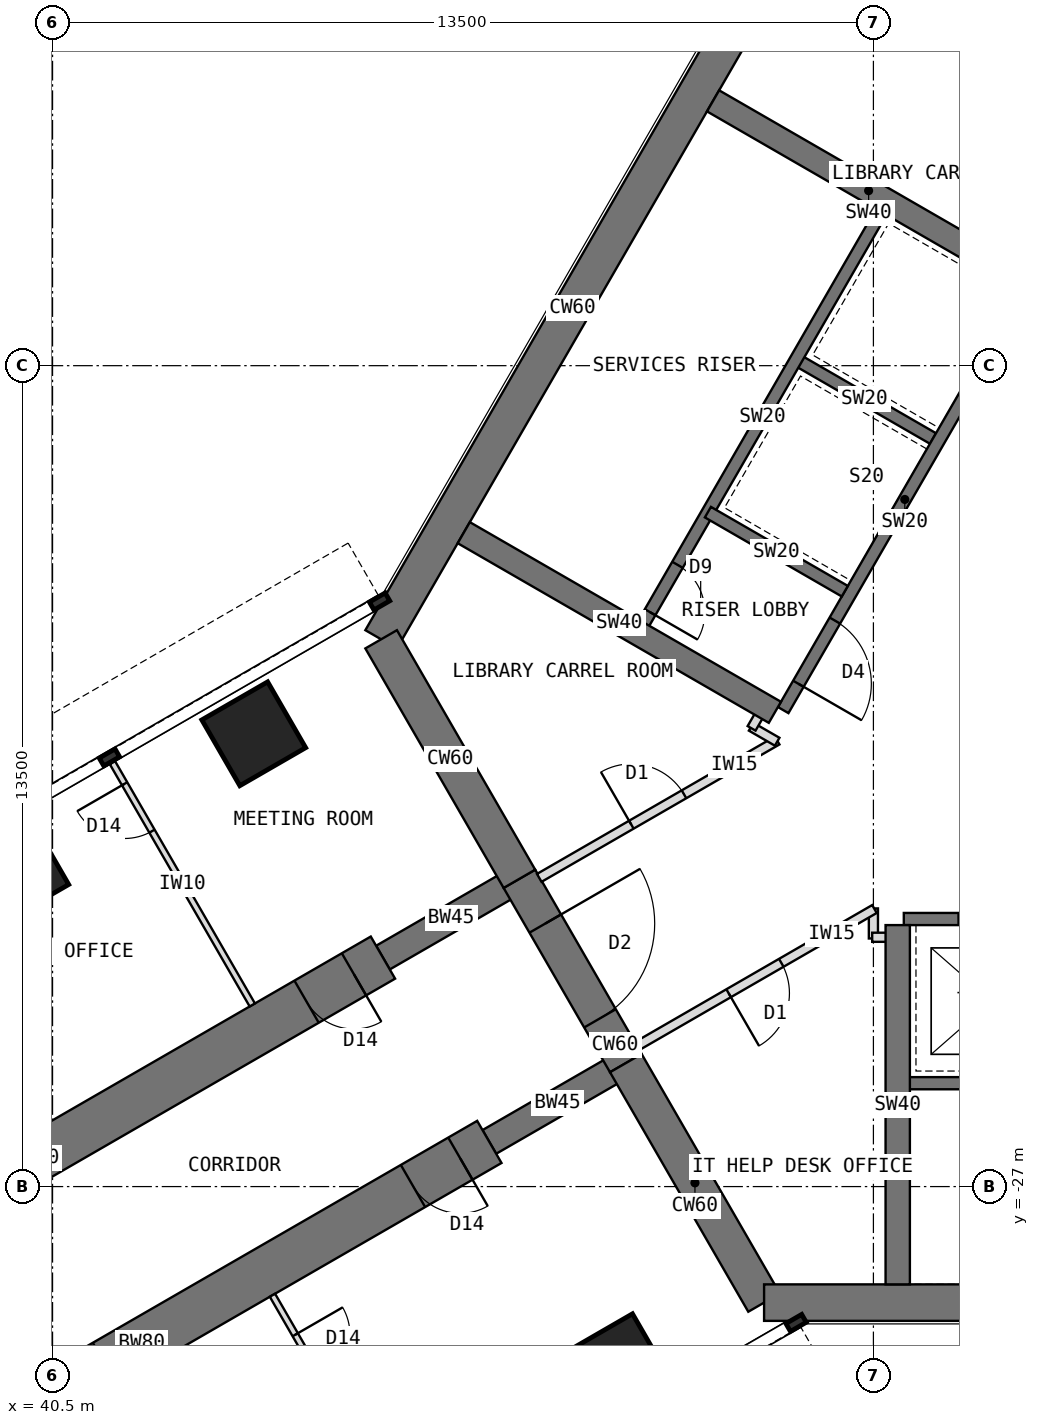
"""IFC4 building model, lengths in metres.
Left out: names, types, materials, properties, quantities, classifications, styles, units other than length and angle.
Written with IfcOpenShell. Run it as: python <this file> out.ifc"""

import sys

from ifc_helpers import new_model, si_unit, direction, frame, frame_2d, origin, origin_2d, place, context, subcontext, project, spatial, rectangle, extrude, element, fill, save


model = new_model("IFC4")
c1 = context("Model", 3, precision=1e-05, world=origin(), true_north=direction((0.0, 1.0)))
c2 = subcontext(c1, "Body", "Model", "MODEL_VIEW")
j1 = project(units=[si_unit("LENGTHUNIT", "METRE"), si_unit("PLANEANGLEUNIT", "RADIAN")], contexts=[c1])
p1 = place(None, origin())
s1 = spatial("IfcSite", under=j1, at=p1, CompositionType="ELEMENT")
p2 = place(p1, origin())
s2 = spatial("IfcBuilding", under=s1, at=p2, CompositionType="ELEMENT")
p3 = place(p2, frame((0.0, 0.0, 145.5)))
s3 = spatial("IfcBuildingStorey", under=s2, at=p3, CompositionType="ELEMENT", Elevation=145.5)
p4 = place(p3, frame((52.202, -7.092, 0.0), z_axis=(0.0, 0.0, 1.0), x_axis=(-0.500005998175, -0.866021940709, 0.0)))
e1 = element("IfcWall", 1, at=p4, inside=s3, PredefinedType="SHEAR", context=c2, shape_type="SweptSolid", body=[
    extrude(rectangle(XDim=12.596, YDim=0.6, at=frame_2d((6.298, 0.0))), origin(), (0.0, 0.0, 1.0), 4.0),
])
p5 = place(p3, frame((45.904, -18.0, 0.0), z_axis=(0.0, 0.0, 1.0), x_axis=(0.500024481964, -0.866011268655, 0.0)))
e2 = element("IfcWall", 2, at=p5, inside=s3, PredefinedType="SHEAR", context=c2, shape_type="SweptSolid", body=[
    extrude(rectangle(XDim=4.548, YDim=0.6, at=frame_2d((2.274, 0.0))), origin(), (0.0, 0.0, 1.0), 4.0),
])
p6 = place(p3, frame((48.178, -21.939, 0.0), z_axis=(0.0, 0.0, 1.0), x_axis=(0.500010275428, -0.866019471182, 0.0)))
e3 = element("IfcWall", 3, at=p6, inside=s3, PredefinedType="SHEAR", context=c2, shape_type="SweptSolid", body=[
    extrude(rectangle(XDim=3.5, YDim=0.6, at=frame_2d((1.75, 0.0))), origin(), (0.0, 0.0, 1.0), 4.0),
])
p7 = place(p6, frame((0.85, 0.0, 0.0)))
e4 = element("IfcOpeningElement", 4, at=p7, cuts=e3, PredefinedType="OPENING", context=c2, shape_type="SweptSolid", body=[
    extrude(rectangle(XDim=1.8, YDim=2.1, at=frame_2d((0.9, 1.05))), frame((0.0, 0.31, 0.0), z_axis=(0.0, -1.0, 0.0), x_axis=(1.0, 0.0, 0.0)), (0.0, 0.0, 1.0), 0.62),
])
p8 = place(p3, frame((49.928, -24.97, 0.0), z_axis=(0.0, 0.0, 1.0), x_axis=(0.499984222037, -0.866034513004, 0.0)))
e5 = element("IfcWall", 5, at=p8, inside=s3, PredefinedType="SHEAR", context=c2, shape_type="SweptSolid", body=[
    extrude(rectangle(XDim=4.548, YDim=0.6, at=frame_2d((2.274, 0.0))), origin(), (0.0, 0.0, 1.0), 4.0),
])
p9 = place(p3, frame((52.202, -28.908, 0.0), z_axis=(0.0, 0.0, 1.0), x_axis=(1.0, 0.0, 0.0)))
e6 = element("IfcWall", 6, at=p9, inside=s3, PredefinedType="SHEAR", context=c2, shape_type="SweptSolid", body=[
    extrude(rectangle(XDim=12.596, YDim=0.6, at=frame_2d((6.298, 0.0))), origin(), (0.0, 0.0, 1.0), 4.0),
])
p10 = place(p3, frame((49.928, -24.97, 0.0), z_axis=(0.0, 0.0, 1.0), x_axis=(-0.866031863473, -0.499988811324, 0.0)))
e7 = element("IfcWall", 7, at=p10, inside=s3, PredefinedType="SHEAR", context=c2, shape_type="SweptSolid", body=[
    extrude(rectangle(XDim=2.592, YDim=0.45, at=frame_2d((1.296, 0.0))), origin(), (0.0, 0.0, 1.0), 4.0),
])
p11 = place(p3, frame((47.684, -26.266, 0.0), z_axis=(0.0, 0.0, 1.0), x_axis=(-0.866027579429, -0.499996231654, 0.0)))
e8 = element("IfcWall", 8, at=p11, inside=s3, PredefinedType="SHEAR", context=c2, shape_type="SweptSolid", body=[
    extrude(rectangle(XDim=13.2, YDim=0.8, at=frame_2d((6.6, 0.0))), origin(), (0.0, 0.0, 1.0), 4.0),
])
p12 = place(p11, frame((0.55, 0.0, 0.0)))
e9 = element("IfcOpeningElement", 9, at=p12, cuts=e8, PredefinedType="OPENING", context=c2, shape_type="SweptSolid", body=[
    extrude(rectangle(XDim=0.9, YDim=2.1, at=frame_2d((0.45, 1.05))), frame((0.0, 0.41, 0.0), z_axis=(0.0, -1.0, 0.0), x_axis=(1.0, 0.0, 0.0)), (0.0, 0.0, 1.0), 0.82),
])
p13 = place(p11, frame((7.3, 0.0, 0.0)))
e10 = element("IfcOpeningElement", 10, at=p13, cuts=e8, PredefinedType="OPENING", context=c2, shape_type="SweptSolid", body=[
    extrude(rectangle(XDim=0.9, YDim=2.1, at=frame_2d((0.45, 1.05))), frame((0.0, 0.41, 0.0), z_axis=(0.0, -1.0, 0.0), x_axis=(1.0, 0.0, 0.0)), (0.0, 0.0, 1.0), 0.82),
])
p14 = place(p3, frame((48.178, -21.939, 0.0), z_axis=(0.0, 0.0, 1.0), x_axis=(-0.866072649678, -0.499918158782, 0.0)))
e11 = element("IfcWall", 11, at=p14, inside=s3, PredefinedType="SHEAR", context=c2, shape_type="SweptSolid", body=[
    extrude(rectangle(XDim=2.592, YDim=0.45, at=frame_2d((1.296, 0.0))), origin(), (0.0, 0.0, 1.0), 4.0),
])
p15 = place(p3, frame((45.934, -23.234, 0.0), z_axis=(0.0, 0.0, 1.0), x_axis=(-0.866019570528, -0.500010103361, 0.0)))
e12 = element("IfcWall", 12, at=p15, inside=s3, PredefinedType="SHEAR", context=c2, shape_type="SweptSolid", body=[
    extrude(rectangle(XDim=13.2, YDim=0.8, at=frame_2d((6.6, 0.0))), origin(), (0.0, 0.0, 1.0), 4.0),
])
p16 = place(p15, frame((0.55, 0.0, 0.0)))
e13 = element("IfcOpeningElement", 13, at=p16, cuts=e12, PredefinedType="OPENING", context=c2, shape_type="SweptSolid", body=[
    extrude(rectangle(XDim=0.9, YDim=2.1, at=frame_2d((0.45, 1.05))), frame((0.0, 0.41, 0.0), z_axis=(0.0, -1.0, 0.0), x_axis=(1.0, 0.0, 0.0)), (0.0, 0.0, 1.0), 0.82),
])
p17 = place(p15, frame((7.3, 0.0, 0.0)))
e14 = element("IfcOpeningElement", 14, at=p17, cuts=e12, PredefinedType="OPENING", context=c2, shape_type="SweptSolid", body=[
    extrude(rectangle(XDim=0.9, YDim=2.1, at=frame_2d((0.45, 1.05))), frame((0.0, 0.41, 0.0), z_axis=(0.0, -1.0, 0.0), x_axis=(1.0, 0.0, 0.0)), (0.0, 0.0, 1.0), 0.82),
])
for number, where, z_axis, x_axis in (
    (15, (49.809, -29.946, 0.0), (0.0, 0.0, 1.0), (0.866, 0.5, 0.0)),
    (16, (43.809, -19.554, 0.0), (0.0, 0.0, 1.0), (0.866, 0.5, 0.0)),
    (17, (39.912, -21.804, 0.0), (0.0, 0.0, 1.0), (0.866, 0.5, 0.0)),
):
    element("IfcColumn", number, at=place(p3, frame(where, z_axis=z_axis, x_axis=x_axis)), inside=s3, PredefinedType="COLUMN", context=c2, shape_type="SweptSolid", body=[
        extrude(rectangle(XDim=1.25, YDim=1.25, at=origin_2d()), origin(), (0.0, 0.0, 1.0), 4.0),
    ])
p18 = place(p3, frame((56.516, -12.236, 0.0), z_axis=(0.0, 0.0, 1.0), x_axis=(-0.49999894854, -0.866026010844, 0.0)))
e18 = element("IfcWall", 18, at=p18, inside=s3, PredefinedType="SHEAR", context=c2, shape_type="SweptSolid", body=[
    extrude(rectangle(XDim=8.0, YDim=0.2, at=frame_2d((4.0, 0.0))), origin(), (0.0, 0.0, 1.0), 4.0),
])
p19 = place(p18, frame((6.3, 0.0, 0.0)))
e19 = element("IfcOpeningElement", 19, at=p19, cuts=e18, PredefinedType="OPENING", context=c2, shape_type="SweptSolid", body=[
    extrude(rectangle(XDim=1.2, YDim=2.1, at=frame_2d((0.6, 1.05))), frame((0.0, 0.11, 0.0), z_axis=(0.0, -1.0, 0.0), x_axis=(1.0, 0.0, 0.0)), (0.0, 0.0, 1.0), 0.22),
])
for number, where, z_axis, x_axis in (
    (20, (54.98, -14.697, 0.0), (0.0, 0.0, 1.0), (-0.866, 0.5, 0.0)),
    (21, (53.53, -17.209, 0.0), (0.0, 0.0, 1.0), (-0.866, 0.5, 0.0)),
):
    element("IfcWall", number, at=place(p3, frame(where, z_axis=z_axis, x_axis=x_axis)), inside=s3, PredefinedType="SHEAR", context=c2, shape_type="SweptSolid", body=[
        extrude(rectangle(XDim=2.6, YDim=0.2, at=frame_2d((1.3, 0.0))), origin(), (0.0, 0.0, 1.0), 4.0),
    ])
p20 = place(p3, frame((54.178, -10.886, 0.0), z_axis=(0.0, 0.0, 1.0), x_axis=(-0.49999894854, -0.866026010844, 0.0)))
e22 = element("IfcWall", 22, at=p20, inside=s3, PredefinedType="SHEAR", context=c2, shape_type="SweptSolid", body=[
    extrude(rectangle(XDim=8.0, YDim=0.2, at=frame_2d((4.0, 0.0))), origin(), (0.0, 0.0, 1.0), 4.0),
])
p21 = place(p20, frame((6.8, 0.0, 0.0)))
e23 = element("IfcOpeningElement", 23, at=p21, cuts=e22, PredefinedType="OPENING", context=c2, shape_type="SweptSolid", body=[
    extrude(rectangle(XDim=0.9, YDim=2.1, at=frame_2d((0.45, 1.05))), frame((0.0, 0.11, 0.0), z_axis=(0.0, -1.0, 0.0), x_axis=(1.0, 0.0, 0.0)), (0.0, 0.0, 1.0), 0.22),
])
p22 = place(p3, frame((52.38, -19.201, 0.0), z_axis=(0.0, 0.0, 1.0), x_axis=(-0.866027317282, 0.49999668571, 0.0)))
e24 = element("IfcWall", 24, at=p22, inside=s3, PredefinedType="SHEAR", context=c2, shape_type="SweptSolid", body=[
    extrude(rectangle(XDim=5.908, YDim=0.4, at=frame_2d((2.954, 0.0))), origin(), (0.0, 0.0, 1.0), 4.0),
])
p23 = place(p3, frame((56.48, -12.099, 0.0), z_axis=(0.0, 0.0, 1.0), x_axis=(-0.866009424208, 0.500027676417, 0.0)))
e25 = element("IfcWall", 25, at=p23, inside=s3, PredefinedType="SHEAR", context=c2, shape_type="SweptSolid", body=[
    extrude(rectangle(XDim=5.908, YDim=0.4, at=frame_2d((2.954, 0.0))), origin(), (0.0, 0.0, 1.0), 4.0),
])
p24 = place(p3, frame((54.5, -22.6, 0.0), z_axis=(0.0, 0.0, 1.0), x_axis=(1.0, 0.0, 0.0)))
e26 = element("IfcWall", 26, at=p24, inside=s3, PredefinedType="SHEAR", context=c2, shape_type="SweptSolid", body=[
    extrude(rectangle(XDim=8.0, YDim=0.2, at=frame_2d((4.0, 0.0))), origin(), (0.0, 0.0, 1.0), 4.0),
])
p25 = place(p24, frame((6.3, 0.0, 0.0)))
e27 = element("IfcOpeningElement", 27, at=p25, cuts=e26, PredefinedType="OPENING", context=c2, shape_type="SweptSolid", body=[
    extrude(rectangle(XDim=1.2, YDim=2.1, at=frame_2d((0.6, 1.05))), frame((0.0, 0.11, 0.0), z_axis=(0.0, -1.0, 0.0), x_axis=(1.0, 0.0, 0.0)), (0.0, 0.0, 1.0), 0.22),
])
p26 = place(p24, frame((0.9, 0.0, 0.0)))
e28 = element("IfcOpeningElement", 28, at=p26, cuts=e26, PredefinedType="OPENING", context=c2, shape_type="SweptSolid", body=[
    extrude(rectangle(XDim=1.1, YDim=2.2, at=frame_2d((0.55, 1.1))), frame((0.0, 0.11, 0.0), z_axis=(0.0, -1.0, 0.0), x_axis=(1.0, 0.0, 0.0)), (0.0, 0.0, 1.0), 0.22),
])
p27 = place(p3, frame((54.5, -25.3, 0.0), z_axis=(0.0, 0.0, 1.0), x_axis=(1.0, 0.0, 0.0)))
e29 = element("IfcWall", 29, at=p27, inside=s3, PredefinedType="SHEAR", context=c2, shape_type="SweptSolid", body=[
    extrude(rectangle(XDim=8.0, YDim=0.2, at=frame_2d((4.0, 0.0))), origin(), (0.0, 0.0, 1.0), 4.0),
])
p28 = place(p27, frame((6.7, 0.0, 0.0)))
e30 = element("IfcOpeningElement", 30, at=p28, cuts=e29, PredefinedType="OPENING", context=c2, shape_type="SweptSolid", body=[
    extrude(rectangle(XDim=1.1, YDim=2.1, at=frame_2d((0.55, 1.05))), frame((0.0, 0.11, 0.0), z_axis=(0.0, -1.0, 0.0), x_axis=(1.0, 0.0, 0.0)), (0.0, 0.0, 1.0), 0.22),
])
p29 = place(p3, frame((54.4, -22.7, 0.0), z_axis=(0.0, 0.0, 1.0), x_axis=(0.0, -1.0, 0.0)))
e31 = element("IfcWall", 31, at=p29, inside=s3, PredefinedType="SHEAR", context=c2, shape_type="SweptSolid", body=[
    extrude(rectangle(XDim=5.908, YDim=0.4, at=frame_2d((2.954, 0.0))), origin(), (0.0, 0.0, 1.0), 4.0),
])
p30 = place(p3, frame((44.116, -28.787, 0.0), z_axis=(0.0, 0.0, 1.0), x_axis=(0.499957262057, -0.866050077142, 0.0)))
e32 = element("IfcWall", 32, at=p30, inside=s3, PredefinedType="PARTITIONING", context=c2, shape_type="SweptSolid", body=[
    extrude(rectangle(XDim=2.4, YDim=0.1, at=frame_2d((1.2, 0.0))), origin(), (0.0, 0.0, 1.0), 3.8),
])
p31 = place(p30, frame((0.75, 0.0, 0.0)))
e33 = element("IfcOpeningElement", 33, at=p31, cuts=e32, PredefinedType="OPENING", context=c2, shape_type="SweptSolid", body=[
    extrude(rectangle(XDim=0.9, YDim=2.1, at=frame_2d((0.45, 1.05))), frame((0.0, 0.06, 0.0), z_axis=(0.0, -1.0, 0.0), x_axis=(1.0, 0.0, 0.0)), (0.0, 0.0, 1.0), 0.12),
])
p32 = place(p3, frame((43.785, -24.013, 0.0), z_axis=(0.0, 0.0, 1.0), x_axis=(-0.500014953309, 0.866016770315, 0.0)))
e34 = element("IfcWall", 34, at=p32, inside=s3, PredefinedType="PARTITIONING", context=c2, shape_type="SweptSolid", body=[
    extrude(rectangle(XDim=4.6, YDim=0.1, at=frame_2d((2.3, 0.0))), origin(), (0.0, 0.0, 1.0), 3.8),
])
p33 = place(p32, frame((3.3, 0.0, 0.0)))
e35 = element("IfcOpeningElement", 35, at=p33, cuts=e34, PredefinedType="OPENING", context=c2, shape_type="SweptSolid", body=[
    extrude(rectangle(XDim=0.9, YDim=2.1, at=frame_2d((0.45, 1.05))), frame((0.0, 0.06, 0.0), z_axis=(0.0, -1.0, 0.0), x_axis=(1.0, 0.0, 0.0)), (0.0, 0.0, 1.0), 0.12),
])
p34 = place(p3, frame((54.0, -22.92, 0.0), z_axis=(0.0, 0.0, 1.0), x_axis=(0.0, 1.0, 0.0)))
e36 = element("IfcWall", 36, at=p34, inside=s3, PredefinedType="PARTITIONING", context=c2, shape_type="SweptSolid", body=[
    extrude(rectangle(XDim=0.494, YDim=0.15, at=frame_2d((0.247, 0.0))), origin(), (0.0, 0.0, 1.0), 3.8),
])
p35 = place(p3, frame((54.017, -22.436, 0.0), z_axis=(0.0, 0.0, 1.0), x_axis=(-0.86602002524, -0.500009315796, 0.0)))
e37 = element("IfcWall", 37, at=p35, inside=s3, PredefinedType="PARTITIONING", context=c2, shape_type="SweptSolid", body=[
    extrude(rectangle(XDim=4.519, YDim=0.15, at=frame_2d((2.259, 0.0))), origin(), (0.0, 0.0, 1.0), 3.8),
])
p36 = place(p35, frame((1.769, 0.0, 0.0)))
e38 = element("IfcOpeningElement", 38, at=p36, cuts=e37, PredefinedType="OPENING", context=c2, shape_type="SweptSolid", body=[
    extrude(rectangle(XDim=1.0, YDim=2.1, at=frame_2d((0.5, 1.05))), frame((0.0, 0.085, 0.0), z_axis=(0.0, -1.0, 0.0), x_axis=(1.0, 0.0, 0.0)), (0.0, 0.0, 1.0), 0.17),
])
p37 = place(p3, frame((48.504, -21.924, 0.0), z_axis=(0.0, 0.0, 1.0), x_axis=(0.866006515865, 0.500032713409, 0.0)))
e39 = element("IfcWall", 39, at=p37, inside=s3, PredefinedType="PARTITIONING", context=c2, shape_type="SweptSolid", body=[
    extrude(rectangle(XDim=4.518, YDim=0.15, at=frame_2d((2.259, 0.0))), origin(), (0.0, 0.0, 1.0), 3.8),
])
p38 = place(p37, frame((1.749, 0.0, 0.0)))
e40 = element("IfcOpeningElement", 40, at=p38, cuts=e39, PredefinedType="OPENING", context=c2, shape_type="SweptSolid", body=[
    extrude(rectangle(XDim=1.0, YDim=2.1, at=frame_2d((0.5, 1.05))), frame((0.0, 0.085, 0.0), z_axis=(0.0, -1.0, 0.0), x_axis=(1.0, 0.0, 0.0)), (0.0, 0.0, 1.0), 0.17),
])
p39 = place(p3, frame((52.417, -19.684, 0.0), z_axis=(0.0, 0.0, 1.0), x_axis=(-0.865831790172, 0.50033519877, 0.0)))
e41 = element("IfcWall", 41, at=p39, inside=s3, PredefinedType="PARTITIONING", context=c2, shape_type="SweptSolid", body=[
    extrude(rectangle(XDim=0.494, YDim=0.15, at=frame_2d((0.247, 0.0))), origin(), (0.0, 0.0, 1.0), 3.8),
])
for number, where, z_axis, x_axis in (
    (42, (51.997, -19.464, 0.0), (0.0, 0.0, 1.0), (0.5, 0.866, 0.0)),
    (43, (54.41, -22.9, 0.0), (0.0, 0.0, 1.0), (-1.0, 0.0, 0.0)),
):
    element("IfcWall", number, at=place(p3, frame(where, z_axis=z_axis, x_axis=x_axis)), inside=s3, PredefinedType="PARTITIONING", context=c2, shape_type="SweptSolid", body=[
        extrude(rectangle(XDim=0.43, YDim=0.15, at=frame_2d((0.215, 0.0))), origin(), (0.0, 0.0, 1.0), 3.8),
    ])
p40 = place(p19, origin())
e44 = element("IfcDoor", 44, at=p40, inside=s3, OperationType="SINGLE_SWING_RIGHT", PredefinedType="DOOR", context=c2, shape_type="SweptSolid", body=[
    extrude(rectangle(XDim=1.2, YDim=2.1, at=frame_2d((0.6, 1.05))), frame((0.0, 0.025, 0.0), z_axis=(0.0, -1.0, 0.0), x_axis=(1.0, 0.0, 0.0)), (0.0, 0.0, 1.0), 0.05),
])
fill(e19, e44)
p41 = place(p21, origin())
e45 = element("IfcDoor", 45, at=p41, inside=s3, OperationType="SINGLE_SWING_RIGHT", PredefinedType="DOOR", context=c2, shape_type="SweptSolid", body=[
    extrude(rectangle(XDim=0.9, YDim=2.1, at=frame_2d((0.45, 1.05))), frame((0.0, 0.025, 0.0), z_axis=(0.0, -1.0, 0.0), x_axis=(1.0, 0.0, 0.0)), (0.0, 0.0, 1.0), 0.05),
])
fill(e23, e45)
p42 = place(p7, origin())
e46 = element("IfcDoor", 46, at=p42, inside=s3, OperationType="DOUBLE_DOOR_DOUBLE_SWING", PredefinedType="DOOR", context=c2, shape_type="SweptSolid", body=[
    extrude(rectangle(XDim=1.72, YDim=2.06, at=frame_2d((0.9, 1.03))), frame((0.0, 0.025, 0.0), z_axis=(0.0, -1.0, 0.0), x_axis=(1.0, 0.0, 0.0)), (0.0, 0.0, 1.0), 0.05),
    extrude(rectangle(XDim=0.04, YDim=2.1, at=frame_2d((0.02, 1.05))), frame((0.0, 0.3, 0.0), z_axis=(0.0, -1.0, 0.0), x_axis=(1.0, 0.0, 0.0)), (0.0, 0.0, 1.0), 0.6),
    extrude(rectangle(XDim=0.04, YDim=2.1, at=frame_2d((1.78, 1.05))), frame((0.0, 0.3, 0.0), z_axis=(0.0, -1.0, 0.0), x_axis=(1.0, 0.0, 0.0)), (0.0, 0.0, 1.0), 0.6),
    extrude(rectangle(XDim=1.72, YDim=0.04, at=frame_2d((0.9, 2.08))), frame((0.0, 0.3, 0.0), z_axis=(0.0, -1.0, 0.0), x_axis=(1.0, 0.0, 0.0)), (0.0, 0.0, 1.0), 0.6),
])
fill(e4, e46)
p43 = place(p31, origin())
e47 = element("IfcDoor", 47, at=p43, inside=s3, OperationType="SINGLE_SWING_LEFT", PredefinedType="DOOR", context=c2, shape_type="SweptSolid", body=[
    extrude(rectangle(XDim=0.9, YDim=2.1, at=frame_2d((0.45, 1.05))), frame((0.0, 0.025, 0.0), z_axis=(0.0, -1.0, 0.0), x_axis=(1.0, 0.0, 0.0)), (0.0, 0.0, 1.0), 0.05),
])
fill(e33, e47)
p44 = place(p33, origin())
e48 = element("IfcDoor", 48, at=p44, inside=s3, OperationType="SINGLE_SWING_RIGHT", PredefinedType="DOOR", context=c2, shape_type="SweptSolid", body=[
    extrude(rectangle(XDim=0.9, YDim=2.1, at=frame_2d((0.45, 1.05))), frame((0.0, 0.025, 0.0), z_axis=(0.0, -1.0, 0.0), x_axis=(1.0, 0.0, 0.0)), (0.0, 0.0, 1.0), 0.05),
])
fill(e35, e48)
p45 = place(p38, origin())
e49 = element("IfcDoor", 49, at=p45, inside=s3, OperationType="SINGLE_SWING_LEFT", PredefinedType="DOOR", context=c2, shape_type="SweptSolid", body=[
    extrude(rectangle(XDim=1.0, YDim=2.1, at=frame_2d((0.5, 1.05))), frame((0.0, 0.025, 0.0), z_axis=(0.0, -1.0, 0.0), x_axis=(1.0, 0.0, 0.0)), (0.0, 0.0, 1.0), 0.05),
])
fill(e40, e49)
p46 = place(p36, origin())
e50 = element("IfcDoor", 50, at=p46, inside=s3, OperationType="SINGLE_SWING_RIGHT", PredefinedType="DOOR", context=c2, shape_type="SweptSolid", body=[
    extrude(rectangle(XDim=1.0, YDim=2.1, at=frame_2d((0.5, 1.05))), frame((0.0, 0.025, 0.0), z_axis=(0.0, -1.0, 0.0), x_axis=(1.0, 0.0, 0.0)), (0.0, 0.0, 1.0), 0.05),
])
fill(e38, e50)
p47 = place(p12, origin())
e51 = element("IfcDoor", 51, at=p47, inside=s3, OperationType="SINGLE_SWING_LEFT", PredefinedType="DOOR", context=c2, shape_type="SweptSolid", body=[
    extrude(rectangle(XDim=0.82, YDim=2.06, at=frame_2d((0.45, 1.03))), frame((0.0, 0.025, 0.0), z_axis=(0.0, -1.0, 0.0), x_axis=(1.0, 0.0, 0.0)), (0.0, 0.0, 1.0), 0.05),
    extrude(rectangle(XDim=0.04, YDim=2.1, at=frame_2d((0.02, 1.05))), frame((0.0, 0.4, 0.0), z_axis=(0.0, -1.0, 0.0), x_axis=(1.0, 0.0, 0.0)), (0.0, 0.0, 1.0), 0.8),
    extrude(rectangle(XDim=0.04, YDim=2.1, at=frame_2d((0.88, 1.05))), frame((0.0, 0.4, 0.0), z_axis=(0.0, -1.0, 0.0), x_axis=(1.0, 0.0, 0.0)), (0.0, 0.0, 1.0), 0.8),
    extrude(rectangle(XDim=0.82, YDim=0.04, at=frame_2d((0.45, 2.08))), frame((0.0, 0.4, 0.0), z_axis=(0.0, -1.0, 0.0), x_axis=(1.0, 0.0, 0.0)), (0.0, 0.0, 1.0), 0.8),
])
fill(e9, e51)
p48 = place(p13, origin())
e52 = element("IfcDoor", 52, at=p48, inside=s3, OperationType="SINGLE_SWING_RIGHT", PredefinedType="DOOR", context=c2, shape_type="SweptSolid", body=[
    extrude(rectangle(XDim=0.82, YDim=2.06, at=frame_2d((0.45, 1.03))), frame((0.0, 0.025, 0.0), z_axis=(0.0, -1.0, 0.0), x_axis=(1.0, 0.0, 0.0)), (0.0, 0.0, 1.0), 0.05),
    extrude(rectangle(XDim=0.04, YDim=2.1, at=frame_2d((0.02, 1.05))), frame((0.0, 0.4, 0.0), z_axis=(0.0, -1.0, 0.0), x_axis=(1.0, 0.0, 0.0)), (0.0, 0.0, 1.0), 0.8),
    extrude(rectangle(XDim=0.04, YDim=2.1, at=frame_2d((0.88, 1.05))), frame((0.0, 0.4, 0.0), z_axis=(0.0, -1.0, 0.0), x_axis=(1.0, 0.0, 0.0)), (0.0, 0.0, 1.0), 0.8),
    extrude(rectangle(XDim=0.82, YDim=0.04, at=frame_2d((0.45, 2.08))), frame((0.0, 0.4, 0.0), z_axis=(0.0, -1.0, 0.0), x_axis=(1.0, 0.0, 0.0)), (0.0, 0.0, 1.0), 0.8),
])
fill(e10, e52)
p49 = place(p16, origin())
e53 = element("IfcDoor", 53, at=p49, inside=s3, OperationType="SINGLE_SWING_LEFT", PredefinedType="DOOR", context=c2, shape_type="SweptSolid", body=[
    extrude(rectangle(XDim=0.82, YDim=2.06, at=frame_2d((0.45, 1.03))), frame((0.0, 0.025, 0.0), z_axis=(0.0, -1.0, 0.0), x_axis=(1.0, 0.0, 0.0)), (0.0, 0.0, 1.0), 0.05),
    extrude(rectangle(XDim=0.04, YDim=2.1, at=frame_2d((0.02, 1.05))), frame((0.0, 0.4, 0.0), z_axis=(0.0, -1.0, 0.0), x_axis=(1.0, 0.0, 0.0)), (0.0, 0.0, 1.0), 0.8),
    extrude(rectangle(XDim=0.04, YDim=2.1, at=frame_2d((0.88, 1.05))), frame((0.0, 0.4, 0.0), z_axis=(0.0, -1.0, 0.0), x_axis=(1.0, 0.0, 0.0)), (0.0, 0.0, 1.0), 0.8),
    extrude(rectangle(XDim=0.82, YDim=0.04, at=frame_2d((0.45, 2.08))), frame((0.0, 0.4, 0.0), z_axis=(0.0, -1.0, 0.0), x_axis=(1.0, 0.0, 0.0)), (0.0, 0.0, 1.0), 0.8),
])
fill(e13, e53)
save(model, sys.argv[1])
